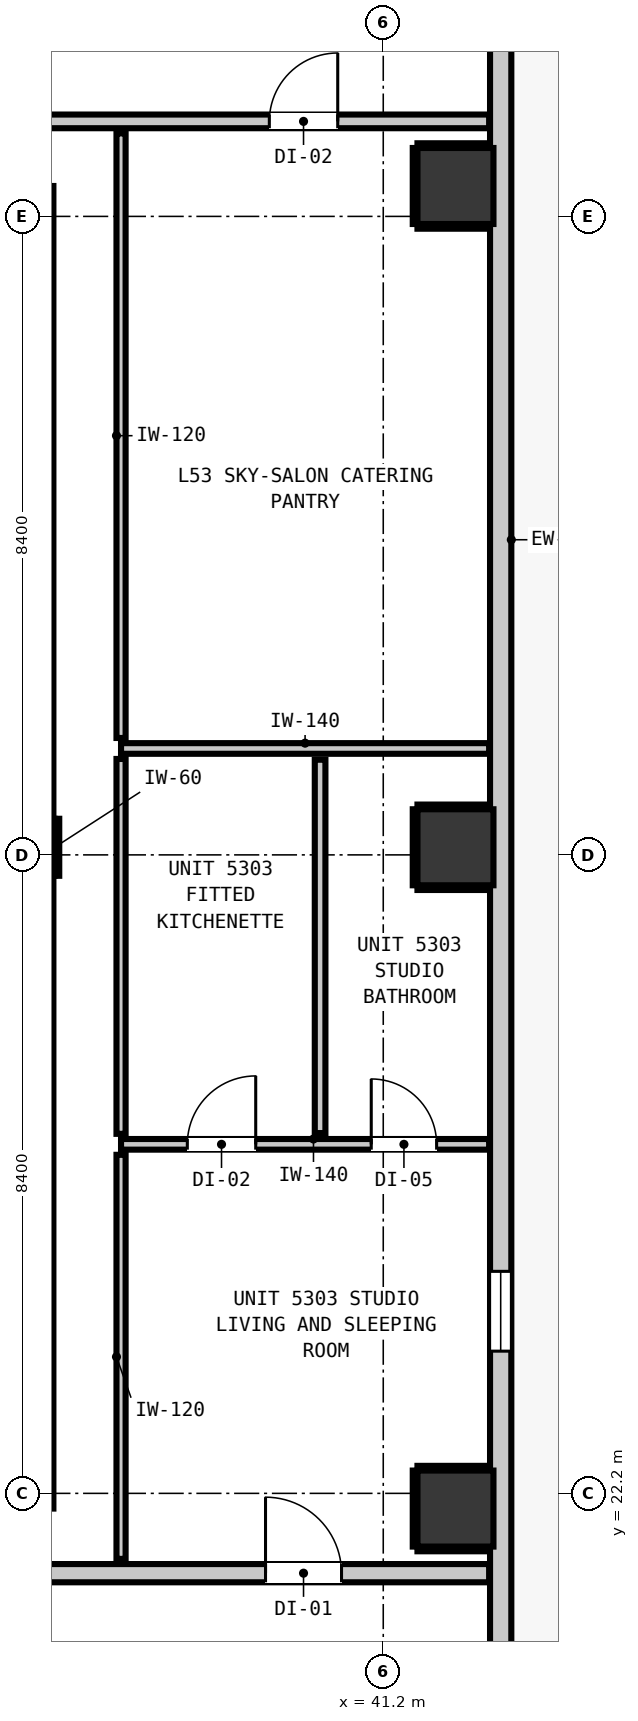
"""IFC4 building model, lengths in metres.
Left out: names, types, materials, properties, quantities, classifications, styles, units other than length and angle.
Written with IfcOpenShell. Run it as: python <this file> out.ifc"""

import sys

from ifc_helpers import new_model, si_unit, direction, frame, frame_2d, origin, origin_2d, place, context, subcontext, project, spatial, rectangle, extrude, element, fill, save


model = new_model("IFC4")
c1 = context("Model", 3, precision=1e-05, world=origin(), true_north=direction((0.0, 1.0)))
c2 = subcontext(c1, "Body", "Model", "MODEL_VIEW")
j1 = project(units=[si_unit("LENGTHUNIT", "METRE"), si_unit("PLANEANGLEUNIT", "RADIAN")], contexts=[c1])
p1 = place(None, origin())
s1 = spatial("IfcSite", under=j1, at=p1, CompositionType="ELEMENT")
p2 = place(p1, origin())
s2 = spatial("IfcBuilding", under=s1, at=p2, CompositionType="ELEMENT")
p3 = place(p2, frame((0.0, 0.0, 183.52)))
s3 = spatial("IfcBuildingStorey", under=s2, at=p3, CompositionType="ELEMENT", Elevation=183.52)
p4 = place(p3, frame((36.5, 30.7, 0.0), z_axis=(0.0, 0.0, 1.0), x_axis=(1.0, 0.0, 0.0)))
e1 = element("IfcColumn", 1, at=p4, inside=s3, PredefinedType="COLUMN", context=c2, shape_type="SweptSolid", body=[
    extrude(rectangle(XDim=0.75, YDim=0.75, at=origin_2d()), origin(), (0.0, 0.0, 1.0), 3.32),
])
p5 = place(p3, frame((36.46, 22.0, 0.0), z_axis=(0.0, 0.0, 1.0), x_axis=(0.0, 1.0, 0.0)))
e2 = element("IfcWall", 2, at=p5, inside=s3, PredefinedType="SHEAR", context=c2, shape_type="SweptSolid", body=[
    extrude(rectangle(XDim=8.32, YDim=0.8, at=frame_2d((4.16, 0.0))), origin(), (0.0, 0.0, 1.0), 3.32),
])
p6 = place(p3, frame((36.46, 31.08, 0.0), z_axis=(0.0, 0.0, 1.0), x_axis=(0.0, 1.0, 0.0)))
e3 = element("IfcWall", 3, at=p6, inside=s3, PredefinedType="SHEAR", context=c2, shape_type="SweptSolid", body=[
    extrude(rectangle(XDim=8.32, YDim=0.8, at=frame_2d((4.16, 0.0))), origin(), (0.0, 0.0, 1.0), 3.32),
])
for number, where, z_axis, x_axis in (
    (4, (42.15, 22.0, 0.0), (0.0, 0.0, 1.0), (1.0, 0.0, 0.0)),
    (5, (42.15, 30.7, 0.0), (0.0, 0.0, 1.0), (1.0, 0.0, 0.0)),
    (6, (42.15, 39.4, 0.0), (0.0, 0.0, 1.0), (1.0, 0.0, 0.0)),
):
    element("IfcColumn", number, at=place(p3, frame(where, z_axis=z_axis, x_axis=x_axis)), inside=s3, PredefinedType="COLUMN", context=c2, shape_type="SweptSolid", body=[
        extrude(rectangle(XDim=1.0, YDim=1.0, at=origin_2d()), origin(), (0.0, 0.0, 1.0), 3.32),
    ])
p7 = place(p3, frame((42.745, 49.845, 0.0), z_axis=(0.0, 0.0, 1.0), x_axis=(0.0, -1.0, 0.0)))
e7 = element("IfcWall", 7, at=p7, inside=s3, PredefinedType="STANDARD", context=c2, shape_type="SweptSolid", body=[
    extrude(rectangle(XDim=32.29, YDim=0.28, at=frame_2d((16.145, 0.0))), origin(), (0.0, 0.0, 1.0), 3.08),
])
p8 = place(p7, frame((0.904, 0.0, 0.0)))
e8 = element("IfcOpeningElement", 8, at=p8, cuts=e7, PredefinedType="OPENING", context=c2, shape_type="SweptSolid", body=[
    extrude(rectangle(XDim=1.0, YDim=2.15, at=frame_2d((0.5, 1.075))), frame((0.0, 0.15, 0.0), z_axis=(0.0, -1.0, 0.0), x_axis=(1.0, 0.0, 0.0)), (0.0, 0.0, 1.0), 0.3),
])
p9 = place(p7, frame((30.822, 0.0, 0.85)))
e9 = element("IfcOpeningElement", 9, at=p9, cuts=e7, PredefinedType="OPENING", context=c2, shape_type="SweptSolid", body=[
    extrude(rectangle(XDim=1.05, YDim=1.65, at=frame_2d((0.525, 0.825))), frame((0.0, 0.15, 0.0), z_axis=(0.0, -1.0, 0.0), x_axis=(1.0, 0.0, 0.0)), (0.0, 0.0, 1.0), 0.3),
])
p10 = place(p7, frame((4.424, 0.0, 0.85)))
e10 = element("IfcOpeningElement", 10, at=p10, cuts=e7, PredefinedType="OPENING", context=c2, shape_type="SweptSolid", body=[
    extrude(rectangle(XDim=1.05, YDim=1.65, at=frame_2d((0.525, 0.825))), frame((0.0, 0.15, 0.0), z_axis=(0.0, -1.0, 0.0), x_axis=(1.0, 0.0, 0.0)), (0.0, 0.0, 1.0), 0.3),
])
p11 = place(p7, frame((24.724, 0.0, 0.85)))
e11 = element("IfcOpeningElement", 11, at=p11, cuts=e7, PredefinedType="OPENING", context=c2, shape_type="SweptSolid", body=[
    extrude(rectangle(XDim=1.05, YDim=1.65, at=frame_2d((0.525, 0.825))), frame((0.0, 0.15, 0.0), z_axis=(0.0, -1.0, 0.0), x_axis=(1.0, 0.0, 0.0)), (0.0, 0.0, 1.0), 0.3),
])
p12 = place(p3, frame((12.983, 21.15, 0.0), z_axis=(0.0, 0.0, 1.0), x_axis=(1.0, 0.0, 0.0)))
e12 = element("IfcWall", 12, at=p12, inside=s3, PredefinedType="PARTITIONING", context=c2, shape_type="SweptSolid", body=[
    extrude(rectangle(XDim=29.61, YDim=0.24, at=frame_2d((14.805, 0.0))), origin(), (0.0, 0.0, 1.0), 3.08),
])
p13 = place(p12, frame((5.227, 0.0, 0.0)))
e13 = element("IfcOpeningElement", 13, at=p13, cuts=e12, PredefinedType="OPENING", context=c2, shape_type="SweptSolid", body=[
    extrude(rectangle(XDim=1.1, YDim=2.15, at=frame_2d((0.55, 1.075))), frame((0.0, 0.13, 0.0), z_axis=(0.0, -1.0, 0.0), x_axis=(1.0, 0.0, 0.0)), (0.0, 0.0, 1.0), 0.26),
])
p14 = place(p12, frame((26.668, 0.0, 0.0)))
e14 = element("IfcOpeningElement", 14, at=p14, cuts=e12, PredefinedType="OPENING", context=c2, shape_type="SweptSolid", body=[
    extrude(rectangle(XDim=1.0, YDim=2.15, at=frame_2d((0.5, 1.075))), frame((0.0, 0.13, 0.0), z_axis=(0.0, -1.0, 0.0), x_axis=(1.0, 0.0, 0.0)), (0.0, 0.0, 1.0), 0.26),
])
p15 = place(p3, frame((3.207, 40.25, 0.0), z_axis=(0.0, 0.0, 1.0), x_axis=(1.0, 0.0, 0.0)))
e15 = element("IfcWall", 15, at=p15, inside=s3, PredefinedType="PARTITIONING", context=c2, shape_type="SweptSolid", body=[
    extrude(rectangle(XDim=39.386, YDim=0.18, at=frame_2d((19.693, 0.0))), origin(), (0.0, 0.0, 1.0), 3.08),
])
p16 = place(p15, frame((14.228, 0.0, 0.0)))
e16 = element("IfcOpeningElement", 16, at=p16, cuts=e15, PredefinedType="OPENING", context=c2, shape_type="SweptSolid", body=[
    extrude(rectangle(XDim=1.4, YDim=2.15, at=frame_2d((0.7, 1.075))), frame((0.0, 0.1, 0.0), z_axis=(0.0, -1.0, 0.0), x_axis=(1.0, 0.0, 0.0)), (0.0, 0.0, 1.0), 0.2),
])
p17 = place(p15, frame((1.267, 0.0, 0.0)))
e17 = element("IfcOpeningElement", 17, at=p17, cuts=e15, PredefinedType="OPENING", context=c2, shape_type="SweptSolid", body=[
    extrude(rectangle(XDim=0.9, YDim=2.1, at=frame_2d((0.45, 1.05))), frame((0.0, 0.1, 0.0), z_axis=(0.0, -1.0, 0.0), x_axis=(1.0, 0.0, 0.0)), (0.0, 0.0, 1.0), 0.2),
])
p18 = place(p15, frame((5.694, 0.0, 0.0)))
e18 = element("IfcOpeningElement", 18, at=p18, cuts=e15, PredefinedType="OPENING", context=c2, shape_type="SweptSolid", body=[
    extrude(rectangle(XDim=0.95, YDim=2.1, at=frame_2d((0.475, 1.05))), frame((0.0, 0.1, 0.0), z_axis=(0.0, -1.0, 0.0), x_axis=(1.0, 0.0, 0.0)), (0.0, 0.0, 1.0), 0.2),
])
p19 = place(p15, frame((36.494, 0.0, 0.0)))
e19 = element("IfcOpeningElement", 19, at=p19, cuts=e15, PredefinedType="OPENING", context=c2, shape_type="SweptSolid", body=[
    extrude(rectangle(XDim=0.9, YDim=2.1, at=frame_2d((0.45, 1.05))), frame((0.0, 0.1, 0.0), z_axis=(0.0, -1.0, 0.0), x_axis=(1.0, 0.0, 0.0)), (0.0, 0.0, 1.0), 0.2),
])
p20 = place(p3, frame((37.75, 26.792, 0.0), z_axis=(0.0, 0.0, 1.0), x_axis=(1.0, 0.0, 0.0)))
e20 = element("IfcWall", 20, at=p20, inside=s3, PredefinedType="PARTITIONING", context=c2, shape_type="SweptSolid", body=[
    extrude(rectangle(XDim=4.843, YDim=0.14, at=frame_2d((2.421, 0.0))), origin(), (0.0, 0.0, 1.0), 3.08),
])
p21 = place(p20, frame((0.872, 0.0, 0.0)))
e21 = element("IfcOpeningElement", 21, at=p21, cuts=e20, PredefinedType="OPENING", context=c2, shape_type="SweptSolid", body=[
    extrude(rectangle(XDim=0.9, YDim=2.1, at=frame_2d((0.45, 1.05))), frame((0.0, 0.08, 0.0), z_axis=(0.0, -1.0, 0.0), x_axis=(1.0, 0.0, 0.0)), (0.0, 0.0, 1.0), 0.16),
])
p22 = place(p20, frame((3.292, 0.0, 0.0)))
e22 = element("IfcOpeningElement", 22, at=p22, cuts=e20, PredefinedType="OPENING", context=c2, shape_type="SweptSolid", body=[
    extrude(rectangle(XDim=0.86, YDim=2.02, at=frame_2d((0.43, 1.01))), frame((0.0, 0.08, 0.0), z_axis=(0.0, -1.0, 0.0), x_axis=(1.0, 0.0, 0.0)), (0.0, 0.0, 1.0), 0.16),
])
p23 = place(p3, frame((37.75, 32.0, 0.0), z_axis=(0.0, 0.0, 1.0), x_axis=(1.0, 0.0, 0.0)))
e23 = element("IfcWall", 23, at=p23, inside=s3, PredefinedType="PARTITIONING", context=c2, shape_type="SweptSolid", body=[
    extrude(rectangle(XDim=4.843, YDim=0.14, at=frame_2d((2.421, 0.0))), origin(), (0.0, 0.0, 1.0), 3.08),
])
p24 = place(p3, frame((40.369, 26.94, 0.0), z_axis=(0.0, 0.0, 1.0), x_axis=(0.0, 1.0, 0.0)))
e24 = element("IfcWall", 24, at=p24, inside=s3, PredefinedType="PARTITIONING", context=c2, shape_type="SweptSolid", body=[
    extrude(rectangle(XDim=4.912, YDim=0.14, at=frame_2d((2.456, 0.0))), origin(), (0.0, 0.0, 1.0), 3.08),
])
p25 = place(p3, frame((37.75, 21.338, 0.0), z_axis=(0.0, 0.0, 1.0), x_axis=(0.0, 1.0, 0.0)))
e25 = element("IfcWall", 25, at=p25, inside=s3, PredefinedType="PARTITIONING", context=c2, shape_type="SweptSolid", body=[
    extrude(rectangle(XDim=5.316, YDim=0.12, at=frame_2d((2.658, 0.0))), origin(), (0.0, 0.0, 1.0), 3.08),
])
p26 = place(p3, frame((37.75, 26.93, 0.0), z_axis=(0.0, 0.0, 1.0), x_axis=(0.0, 1.0, 0.0)))
e26 = element("IfcWall", 26, at=p26, inside=s3, PredefinedType="PARTITIONING", context=c2, shape_type="SweptSolid", body=[
    extrude(rectangle(XDim=4.932, YDim=0.12, at=frame_2d((2.466, 0.0))), origin(), (0.0, 0.0, 1.0), 3.08),
])
p27 = place(p3, frame((37.75, 32.138, 0.0), z_axis=(0.0, 0.0, 1.0), x_axis=(0.0, 1.0, 0.0)))
e27 = element("IfcWall", 27, at=p27, inside=s3, PredefinedType="PARTITIONING", context=c2, shape_type="SweptSolid", body=[
    extrude(rectangle(XDim=7.954, YDim=0.12, at=frame_2d((3.977, 0.0))), origin(), (0.0, 0.0, 1.0), 3.08),
])
p28 = place(p3, frame((36.907, 30.325, 0.0), z_axis=(0.0, 0.0, 1.0), x_axis=(0.0, 1.0, 0.0)))
e28 = element("IfcWall", 28, at=p28, inside=s3, PredefinedType="PARTITIONING", context=c2, shape_type="SweptSolid", body=[
    extrude(rectangle(XDim=0.75, YDim=0.06, at=frame_2d((0.375, 0.0))), origin(), (0.0, 0.0, 1.0), 1.45),
])
for number, where, z_axis, x_axis in (
    (29, (41.65, 21.468, 0.0), (0.0, 0.0, 1.0), (1.0, 0.0, 0.0)),
    (30, (41.65, 22.532, 0.0), (0.0, 0.0, 1.0), (1.0, 0.0, 0.0)),
):
    element("IfcWall", number, at=place(p3, frame(where, z_axis=z_axis, x_axis=x_axis)), inside=s3, PredefinedType="PARTITIONING", context=c2, shape_type="SweptSolid", body=[
        extrude(rectangle(XDim=0.94, YDim=0.06, at=frame_2d((0.47, 0.0))), origin(), (0.0, 0.0, 1.0), 1.45),
    ])
p29 = place(p3, frame((41.618, 21.5, 0.0), z_axis=(0.0, 0.0, 1.0), x_axis=(0.0, 1.0, 0.0)))
e31 = element("IfcWall", 31, at=p29, inside=s3, PredefinedType="PARTITIONING", context=c2, shape_type="SweptSolid", body=[
    extrude(rectangle(XDim=1.0, YDim=0.06, at=frame_2d((0.5, 0.0))), origin(), (0.0, 0.0, 1.0), 1.45),
])
for number, where, z_axis, x_axis in (
    (32, (41.65, 30.168, 0.0), (0.0, 0.0, 1.0), (1.0, 0.0, 0.0)),
    (33, (41.65, 31.232, 0.0), (0.0, 0.0, 1.0), (1.0, 0.0, 0.0)),
):
    element("IfcWall", number, at=place(p3, frame(where, z_axis=z_axis, x_axis=x_axis)), inside=s3, PredefinedType="PARTITIONING", context=c2, shape_type="SweptSolid", body=[
        extrude(rectangle(XDim=0.94, YDim=0.06, at=frame_2d((0.47, 0.0))), origin(), (0.0, 0.0, 1.0), 1.45),
    ])
p30 = place(p3, frame((41.618, 30.2, 0.0), z_axis=(0.0, 0.0, 1.0), x_axis=(0.0, 1.0, 0.0)))
e34 = element("IfcWall", 34, at=p30, inside=s3, PredefinedType="PARTITIONING", context=c2, shape_type="SweptSolid", body=[
    extrude(rectangle(XDim=1.0, YDim=0.06, at=frame_2d((0.5, 0.0))), origin(), (0.0, 0.0, 1.0), 1.45),
])
for number, where, z_axis, x_axis in (
    (35, (41.65, 38.868, 0.0), (0.0, 0.0, 1.0), (1.0, 0.0, 0.0)),
    (36, (41.65, 39.932, 0.0), (0.0, 0.0, 1.0), (1.0, 0.0, 0.0)),
):
    element("IfcWall", number, at=place(p3, frame(where, z_axis=z_axis, x_axis=x_axis)), inside=s3, PredefinedType="PARTITIONING", context=c2, shape_type="SweptSolid", body=[
        extrude(rectangle(XDim=0.94, YDim=0.06, at=frame_2d((0.47, 0.0))), origin(), (0.0, 0.0, 1.0), 1.45),
    ])
p31 = place(p3, frame((41.618, 38.9, 0.0), z_axis=(0.0, 0.0, 1.0), x_axis=(0.0, 1.0, 0.0)))
e37 = element("IfcWall", 37, at=p31, inside=s3, PredefinedType="PARTITIONING", context=c2, shape_type="SweptSolid", body=[
    extrude(rectangle(XDim=1.0, YDim=0.06, at=frame_2d((0.5, 0.0))), origin(), (0.0, 0.0, 1.0), 1.45),
])
p32 = place(p11, origin())
e38 = element("IfcWindow", 38, at=p32, inside=s3, PartitioningType="SINGLE_PANEL", PredefinedType="WINDOW", context=c2, shape_type="SweptSolid", body=[
    extrude(rectangle(XDim=1.05, YDim=1.65, at=frame_2d((0.525, 0.825))), frame((0.0, 0.03, 0.0), z_axis=(0.0, -1.0, 0.0), x_axis=(1.0, 0.0, 0.0)), (0.0, 0.0, 1.0), 0.06),
])
fill(e11, e38)
p33 = place(p14, origin())
e39 = element("IfcDoor", 39, at=p33, inside=s3, OperationType="SINGLE_SWING_LEFT", PredefinedType="DOOR", context=c2, shape_type="SweptSolid", body=[
    extrude(rectangle(XDim=1.0, YDim=2.15, at=frame_2d((0.5, 1.075))), frame((0.0, 0.025, 0.0), z_axis=(0.0, -1.0, 0.0), x_axis=(1.0, 0.0, 0.0)), (0.0, 0.0, 1.0), 0.05),
])
fill(e14, e39)
p34 = place(p21, origin())
e40 = element("IfcDoor", 40, at=p34, inside=s3, OperationType="SINGLE_SWING_RIGHT", PredefinedType="DOOR", context=c2, shape_type="SweptSolid", body=[
    extrude(rectangle(XDim=0.9, YDim=2.1, at=frame_2d((0.45, 1.05))), frame((0.0, 0.025, 0.0), z_axis=(0.0, -1.0, 0.0), x_axis=(1.0, 0.0, 0.0)), (0.0, 0.0, 1.0), 0.05),
])
fill(e21, e40)
p35 = place(p22, origin())
e41 = element("IfcDoor", 41, at=p35, inside=s3, OperationType="SINGLE_SWING_LEFT", PredefinedType="DOOR", context=c2, shape_type="SweptSolid", body=[
    extrude(rectangle(XDim=0.86, YDim=2.02, at=frame_2d((0.43, 1.01))), frame((0.0, 0.025, 0.0), z_axis=(0.0, -1.0, 0.0), x_axis=(1.0, 0.0, 0.0)), (0.0, 0.0, 1.0), 0.05),
])
fill(e22, e41)
p36 = place(p19, origin())
e42 = element("IfcDoor", 42, at=p36, inside=s3, OperationType="SINGLE_SWING_RIGHT", PredefinedType="DOOR", context=c2, shape_type="SweptSolid", body=[
    extrude(rectangle(XDim=0.9, YDim=2.1, at=frame_2d((0.45, 1.05))), frame((0.0, 0.025, 0.0), z_axis=(0.0, -1.0, 0.0), x_axis=(1.0, 0.0, 0.0)), (0.0, 0.0, 1.0), 0.05),
])
fill(e19, e42)
save(model, sys.argv[1])
